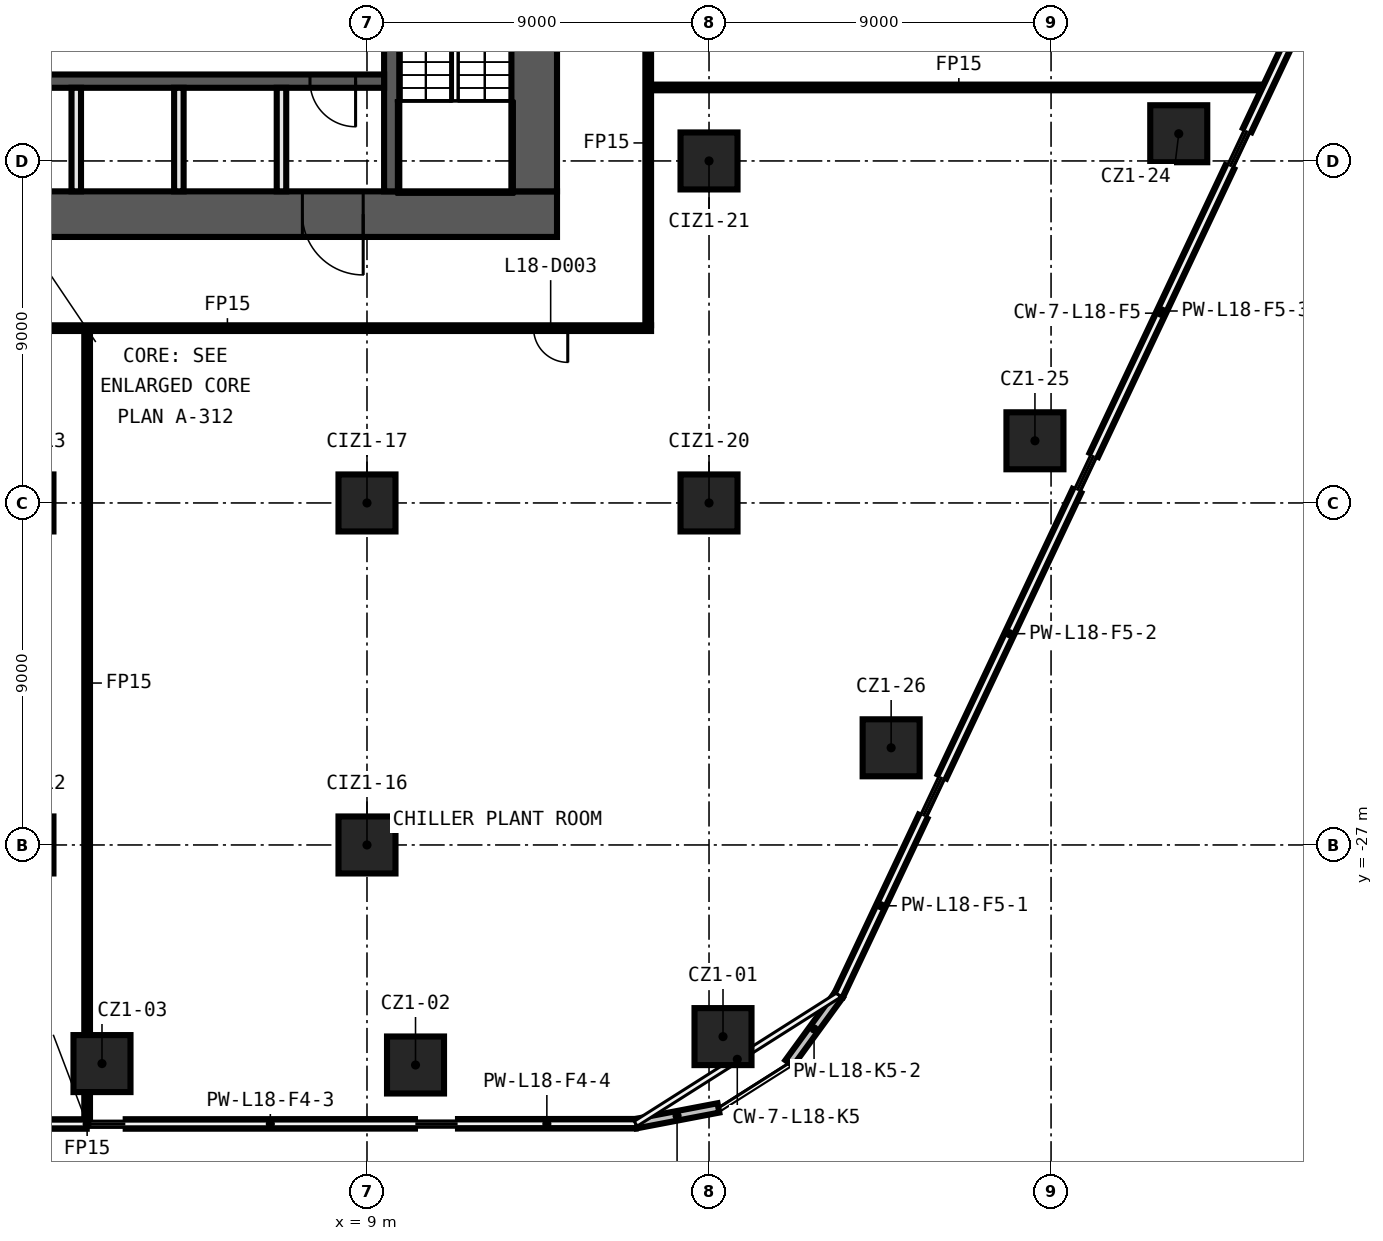
"""IFC4 building model, lengths in metres.
Left out: names, types, materials, properties, quantities, classifications, styles, units other than length and angle.
Written with IfcOpenShell. Run it as: python <this file> out.ifc"""

import sys

from ifc_helpers import new_model, si_unit, direction, frame, frame_2d, origin, origin_2d, place, context, subcontext, project, spatial, rectangle, extrude, element, fill, save


model = new_model("IFC4")
c1 = context("Model", 3, precision=1e-05, world=origin(), true_north=direction((0.0, 1.0)))
c2 = subcontext(c1, "Body", "Model", "MODEL_VIEW")
j1 = project(units=[si_unit("LENGTHUNIT", "METRE"), si_unit("PLANEANGLEUNIT", "RADIAN")], contexts=[c1])
p1 = place(None, origin())
s1 = spatial("IfcSite", under=j1, at=p1, CompositionType="ELEMENT")
p2 = place(p1, origin())
s2 = spatial("IfcBuilding", under=s1, at=p2, CompositionType="ELEMENT")
p3 = place(p2, frame((0.0, 0.0, 89.2)))
s3 = spatial("IfcBuildingStorey", under=s2, at=p3, CompositionType="ELEMENT", Elevation=89.2)
for number, where, z_axis, x_axis in (
    (1, (18.368, -32.043, 0.0), (0.0, 0.0, 1.0), (1.0, 0.0, 0.0)),
    (2, (10.277, -32.79, 0.0), (0.0, 0.0, 1.0), (1.0, 0.0, 0.0)),
    (3, (2.027, -32.753, 0.0), (0.0, 0.0, 1.0), (1.0, 0.0, 0.0)),
    (4, (30.36, -8.284, 0.0), (0.0, 0.0, 1.0), (1.0, 0.0, 0.0)),
    (5, (26.576, -16.364, 0.0), (0.0, 0.0, 1.0), (1.0, 0.0, 0.0)),
    (6, (22.792, -24.443, 0.0), (0.0, 0.0, 1.0), (1.0, 0.0, 0.0)),
    (7, (0.0, -27.0, 0.0), (0.0, 0.0, 1.0), (1.0, 0.0, 0.0)),
    (8, (0.0, -18.0, 0.0), (0.0, 0.0, 1.0), (1.0, 0.0, 0.0)),
    (9, (9.0, -27.0, 0.0), (0.0, 0.0, 1.0), (1.0, 0.0, 0.0)),
    (10, (9.0, -18.0, 0.0), (0.0, 0.0, 1.0), (1.0, 0.0, 0.0)),
    (11, (18.0, -18.0, 0.0), (0.0, 0.0, 1.0), (1.0, 0.0, 0.0)),
    (12, (18.0, -9.0, 0.0), (0.0, 0.0, 1.0), (1.0, 0.0, 0.0)),
):
    element("IfcColumn", number, at=place(p3, frame(where, z_axis=z_axis, x_axis=x_axis)), inside=s3, PredefinedType="COLUMN", context=c2, shape_type="SweptSolid", body=[
        extrude(rectangle(XDim=1.5, YDim=1.5, at=origin_2d()), origin(), (0.0, 0.0, 1.0), 5.55),
    ])
p4 = place(p3, frame((16.475, -13.4, 0.0), z_axis=(0.0, 0.0, 1.0), x_axis=(-1.0, 0.0, 0.0)))
e13 = element("IfcWall", 13, at=p4, inside=s3, PredefinedType="PARTITIONING", context=c2, shape_type="SweptSolid", body=[
    extrude(rectangle(XDim=32.95, YDim=0.15, at=frame_2d((16.475, 0.0))), origin(), (0.0, 0.0, 1.0), 5.55),
])
p5 = place(p4, frame((19.203, 0.0, 0.0)))
e14 = element("IfcOpeningElement", 14, at=p5, cuts=e13, PredefinedType="OPENING", context=c2, shape_type="SweptSolid", body=[
    extrude(rectangle(XDim=0.9, YDim=2.1, at=frame_2d((0.45, 1.05))), frame((0.0, 0.085, 0.0), z_axis=(0.0, -1.0, 0.0), x_axis=(1.0, 0.0, 0.0)), (0.0, 0.0, 1.0), 0.17),
])
p6 = place(p4, frame((2.192, 0.0, 0.0)))
e15 = element("IfcOpeningElement", 15, at=p6, cuts=e13, PredefinedType="OPENING", context=c2, shape_type="SweptSolid", body=[
    extrude(rectangle(XDim=0.9, YDim=2.1, at=frame_2d((0.45, 1.05))), frame((0.0, 0.085, 0.0), z_axis=(0.0, -1.0, 0.0), x_axis=(1.0, 0.0, 0.0)), (0.0, 0.0, 1.0), 0.17),
])
p7 = place(p3, frame((16.475, -7.066, 0.0), z_axis=(0.0, 0.0, 1.0), x_axis=(1.0, 0.0, 0.0)))
e16 = element("IfcWall", 16, at=p7, inside=s3, PredefinedType="PARTITIONING", context=c2, shape_type="SweptSolid", body=[
    extrude(rectangle(XDim=16.197, YDim=0.15, at=frame_2d((8.099, 0.0))), origin(), (0.0, 0.0, 1.0), 5.55),
])
p8 = place(p3, frame((16.4, 13.325, 0.0), z_axis=(0.0, 0.0, 1.0), x_axis=(0.0, -1.0, 0.0)))
e17 = element("IfcWall", 17, at=p8, inside=s3, PredefinedType="PARTITIONING", context=c2, shape_type="SweptSolid", body=[
    extrude(rectangle(XDim=26.65, YDim=0.15, at=frame_2d((13.325, 0.0))), origin(), (0.0, 0.0, 1.0), 5.55),
])
p9 = place(p8, frame((15.952, 0.0, 0.0)))
e18 = element("IfcOpeningElement", 18, at=p9, cuts=e17, PredefinedType="OPENING", context=c2, shape_type="SweptSolid", body=[
    extrude(rectangle(XDim=0.9, YDim=2.1, at=frame_2d((0.45, 1.05))), frame((0.0, 0.085, 0.0), z_axis=(0.0, -1.0, 0.0), x_axis=(1.0, 0.0, 0.0)), (0.0, 0.0, 1.0), 0.17),
])
p10 = place(p8, frame((9.969, 0.0, 0.0)))
e19 = element("IfcOpeningElement", 19, at=p10, cuts=e17, PredefinedType="OPENING", context=c2, shape_type="SweptSolid", body=[
    extrude(rectangle(XDim=0.9, YDim=2.1, at=frame_2d((0.45, 1.05))), frame((0.0, 0.085, 0.0), z_axis=(0.0, -1.0, 0.0), x_axis=(1.0, 0.0, 0.0)), (0.0, 0.0, 1.0), 0.17),
])
p11 = place(p8, frame((1.621, 0.0, 0.0)))
e20 = element("IfcOpeningElement", 20, at=p11, cuts=e17, PredefinedType="OPENING", context=c2, shape_type="SweptSolid", body=[
    extrude(rectangle(XDim=0.9, YDim=2.1, at=frame_2d((0.45, 1.05))), frame((0.0, 0.085, 0.0), z_axis=(0.0, -1.0, 0.0), x_axis=(1.0, 0.0, 0.0)), (0.0, 0.0, 1.0), 0.17),
])
p12 = place(p3, frame((1.636, -34.323, 0.0), z_axis=(0.0, 0.0, 1.0), x_axis=(0.0, 1.0, 0.0)))
e21 = element("IfcWall", 21, at=p12, inside=s3, PredefinedType="PARTITIONING", context=c2, shape_type="SweptSolid", body=[
    extrude(rectangle(XDim=0.82, YDim=0.15, at=frame_2d((0.41, 0.0))), origin(), (0.0, 0.0, 1.0), 5.55),
])
p13 = place(p3, frame((1.636, -32.003, 0.0), z_axis=(0.0, 0.0, 1.0), x_axis=(0.0, 1.0, 0.0)))
e22 = element("IfcWall", 22, at=p13, inside=s3, PredefinedType="PARTITIONING", context=c2, shape_type="SweptSolid", body=[
    extrude(rectangle(XDim=18.528, YDim=0.15, at=frame_2d((9.264, 0.0))), origin(), (0.0, 0.0, 1.0), 5.55),
])
p14 = place(p3, frame((-6.032, -34.347, 0.0), z_axis=(0.0, 0.0, 1.0), x_axis=(0.999999869879, 0.000510138947, 0.0)))
e23 = element("IfcWall", 23, at=p14, inside=s3, PredefinedType="SOLIDWALL", context=c2, shape_type="SweptSolid", body=[
    extrude(rectangle(XDim=7.657, YDim=0.25, at=frame_2d((3.829, 0.0))), origin(), (0.0, 0.0, 1.0), 5.55),
])
p15 = place(p3, frame((2.651, -34.342, 0.0), z_axis=(0.0, 0.0, 1.0), x_axis=(0.99999985131, 0.000545326152, 0.0)))
e24 = element("IfcWall", 24, at=p15, inside=s3, PredefinedType="SOLIDWALL", context=c2, shape_type="SweptSolid", body=[
    extrude(rectangle(XDim=7.611, YDim=0.25, at=frame_2d((3.805, 0.0))), origin(), (0.0, 0.0, 1.0), 5.55),
])
p16 = place(p3, frame((11.395, -34.338, 0.0), z_axis=(0.0, 0.0, 1.0), x_axis=(0.999999863686, 0.000522138609, 0.0)))
e25 = element("IfcWall", 25, at=p16, inside=s3, PredefinedType="SOLIDWALL", context=c2, shape_type="SweptSolid", body=[
    extrude(rectangle(XDim=4.676, YDim=0.25, at=frame_2d((2.338, 0.0))), origin(), (0.0, 0.0, 1.0), 5.55),
])
p17 = place(p3, frame((16.071, -34.335, 0.0), z_axis=(0.0, 0.0, 1.0), x_axis=(0.982246854251, 0.187592956464, 0.0)))
e26 = element("IfcWall", 26, at=p17, inside=s3, PredefinedType="SOLIDWALL", context=c2, shape_type="SweptSolid", body=[
    extrude(rectangle(XDim=2.216, YDim=0.25, at=frame_2d((1.108, 0.0))), origin(), (0.0, 0.0, 1.0), 5.55),
])
p18 = place(p3, frame((20.112, -32.738, 0.0), z_axis=(0.0, 0.0, 1.0), x_axis=(0.58864316002, 0.8083929924, 0.0)))
e27 = element("IfcWall", 27, at=p18, inside=s3, PredefinedType="SOLIDWALL", context=c2, shape_type="SweptSolid", body=[
    extrude(rectangle(XDim=2.217, YDim=0.25, at=frame_2d((1.108, 0.0))), origin(), (0.0, 0.0, 1.0), 5.55),
])
p19 = place(p3, frame((21.416, -30.946, 0.0), z_axis=(0.0, 0.0, 1.0), x_axis=(0.427034096602, 0.904235522604, 0.0)))
e28 = element("IfcWall", 28, at=p19, inside=s3, PredefinedType="SOLIDWALL", context=c2, shape_type="SweptSolid", body=[
    extrude(rectangle(XDim=5.188, YDim=0.25, at=frame_2d((2.594, 0.0))), origin(), (0.0, 0.0, 1.0), 5.55),
])
p20 = place(p3, frame((24.131, -25.198, 0.0), z_axis=(0.0, 0.0, 1.0), x_axis=(0.42704433416, 0.904230687746, 0.0)))
e29 = element("IfcWall", 29, at=p20, inside=s3, PredefinedType="SOLIDWALL", context=c2, shape_type="SweptSolid", body=[
    extrude(rectangle(XDim=8.311, YDim=0.25, at=frame_2d((4.156, 0.0))), origin(), (0.0, 0.0, 1.0), 5.55),
])
p21 = place(p3, frame((28.127, -16.736, 0.0), z_axis=(0.0, 0.0, 1.0), x_axis=(0.427037418028, 0.904233954021, 0.0)))
e30 = element("IfcWall", 30, at=p21, inside=s3, PredefinedType="SOLIDWALL", context=c2, shape_type="SweptSolid", body=[
    extrude(rectangle(XDim=8.377, YDim=0.25, at=frame_2d((4.188, 0.0))), origin(), (0.0, 0.0, 1.0), 5.55),
])
p22 = place(p3, frame((32.164, -8.189, 0.0), z_axis=(0.0, 0.0, 1.0), x_axis=(0.427023639186, 0.904240461147, 0.0)))
e31 = element("IfcWall", 31, at=p22, inside=s3, PredefinedType="SOLIDWALL", context=c2, shape_type="SweptSolid", body=[
    extrude(rectangle(XDim=8.317, YDim=0.25, at=frame_2d((4.159, 0.0))), origin(), (0.0, 0.0, 1.0), 5.55),
])
p23 = place(p3, frame((14.0, -10.4, 0.0), z_axis=(0.0, 0.0, 1.0), x_axis=(-1.0, 0.0, 0.0)))
e32 = element("IfcWall", 32, at=p23, inside=s3, PredefinedType="SHEAR", context=c2, shape_type="SweptSolid", body=[
    extrude(rectangle(XDim=28.0, YDim=1.2, at=frame_2d((14.0, 0.0))), origin(), (0.0, 0.0, 1.0), 5.55),
])
p24 = place(p23, frame((5.1, 0.0, 0.0)))
e33 = element("IfcOpeningElement", 33, at=p24, cuts=e32, PredefinedType="OPENING", context=c2, shape_type="SweptSolid", body=[
    extrude(rectangle(XDim=1.6, YDim=2.1, at=frame_2d((0.8, 1.05))), frame((0.0, 0.61, 0.0), z_axis=(0.0, -1.0, 0.0), x_axis=(1.0, 0.0, 0.0)), (0.0, 0.0, 1.0), 1.22),
])
p25 = place(p3, frame((13.4, 9.8, 0.0), z_axis=(0.0, 0.0, 1.0), x_axis=(0.0, -1.0, 0.0)))
e34 = element("IfcWall", 34, at=p25, inside=s3, PredefinedType="SHEAR", context=c2, shape_type="SweptSolid", body=[
    extrude(rectangle(XDim=19.6, YDim=1.2, at=frame_2d((9.8, 0.0))), origin(), (0.0, 0.0, 1.0), 5.55),
])
p26 = place(p3, frame((9.65, -2.3, 0.0), z_axis=(0.0, 0.0, 1.0), x_axis=(0.0, -1.0, 0.0)))
e35 = element("IfcWall", 35, at=p26, inside=s3, PredefinedType="SHEAR", context=c2, shape_type="SweptSolid", body=[
    extrude(rectangle(XDim=7.5, YDim=0.4, at=frame_2d((3.75, 0.0))), origin(), (0.0, 0.0, 1.0), 5.55),
])
p27 = place(p26, frame((1.2, 0.0, 0.0)))
e36 = element("IfcOpeningElement", 36, at=p27, cuts=e35, PredefinedType="OPENING", context=c2, shape_type="SweptSolid", body=[
    extrude(rectangle(XDim=1.2, YDim=2.1, at=frame_2d((0.6, 1.05))), frame((0.0, 0.21, 0.0), z_axis=(0.0, -1.0, 0.0), x_axis=(1.0, 0.0, 0.0)), (0.0, 0.0, 1.0), 0.42),
])
p28 = place(p3, frame((9.45, -6.9, 0.0), z_axis=(0.0, 0.0, 1.0), x_axis=(-1.0, 0.0, 0.0)))
e37 = element("IfcWall", 37, at=p28, inside=s3, PredefinedType="SHEAR", context=c2, shape_type="SweptSolid", body=[
    extrude(rectangle(XDim=18.9, YDim=0.35, at=frame_2d((9.45, 0.0))), origin(), (0.0, 0.0, 1.0), 5.55),
])
p29 = place(p28, frame((0.75, 0.0, 0.0)))
e38 = element("IfcOpeningElement", 38, at=p29, cuts=e37, PredefinedType="OPENING", context=c2, shape_type="SweptSolid", body=[
    extrude(rectangle(XDim=1.2, YDim=2.1, at=frame_2d((0.6, 1.05))), frame((0.0, 0.185, 0.0), z_axis=(0.0, -1.0, 0.0), x_axis=(1.0, 0.0, 0.0)), (0.0, 0.0, 1.0), 0.37),
])
p30 = place(p28, frame((17.1, 0.0, 0.0)))
e39 = element("IfcOpeningElement", 39, at=p30, cuts=e37, PredefinedType="OPENING", context=c2, shape_type="SweptSolid", body=[
    extrude(rectangle(XDim=0.9, YDim=2.1, at=frame_2d((0.45, 1.05))), frame((0.0, 0.185, 0.0), z_axis=(0.0, -1.0, 0.0), x_axis=(1.0, 0.0, 0.0)), (0.0, 0.0, 1.0), 0.37),
])
p31 = place(p28, frame((13.05, 0.0, 0.0)))
e40 = element("IfcOpeningElement", 40, at=p31, cuts=e37, PredefinedType="OPENING", context=c2, shape_type="SweptSolid", body=[
    extrude(rectangle(XDim=0.9, YDim=2.1, at=frame_2d((0.45, 1.05))), frame((0.0, 0.185, 0.0), z_axis=(0.0, -1.0, 0.0), x_axis=(1.0, 0.0, 0.0)), (0.0, 0.0, 1.0), 0.37),
])
p32 = place(p28, frame((9.0, 0.0, 0.0)))
e41 = element("IfcOpeningElement", 41, at=p32, cuts=e37, PredefinedType="OPENING", context=c2, shape_type="SweptSolid", body=[
    extrude(rectangle(XDim=0.9, YDim=2.1, at=frame_2d((0.45, 1.05))), frame((0.0, 0.185, 0.0), z_axis=(0.0, -1.0, 0.0), x_axis=(1.0, 0.0, 0.0)), (0.0, 0.0, 1.0), 0.37),
])
for number, where, z_axis, x_axis in (
    (42, (6.75, -9.8, 0.0), (0.0, 0.0, 1.0), (0.0, 1.0, 0.0)),
    (43, (4.05, -9.8, 0.0), (0.0, 0.0, 1.0), (0.0, 1.0, 0.0)),
    (44, (1.35, -9.8, 0.0), (0.0, 0.0, 1.0), (0.0, 1.0, 0.0)),
):
    element("IfcWall", number, at=place(p3, frame(where, z_axis=z_axis, x_axis=x_axis)), inside=s3, PredefinedType="SOLIDWALL", context=c2, shape_type="SweptSolid", body=[
        extrude(rectangle(XDim=2.725, YDim=0.25, at=frame_2d((1.363, 0.0))), origin(), (0.0, 0.0, 1.0), 5.55),
    ])
p33 = place(p6, origin())
e45 = element("IfcDoor", 45, at=p33, inside=s3, OperationType="SINGLE_SWING_RIGHT", PredefinedType="DOOR", context=c2, shape_type="SweptSolid", body=[
    extrude(rectangle(XDim=0.9, YDim=2.1, at=frame_2d((0.45, 1.05))), frame((0.0, 0.025, 0.0), z_axis=(0.0, -1.0, 0.0), x_axis=(1.0, 0.0, 0.0)), (0.0, 0.0, 1.0), 0.05),
])
fill(e15, e45)
p34 = place(p24, origin())
e46 = element("IfcDoor", 46, at=p34, inside=s3, OperationType="DOUBLE_DOOR_SINGLE_SWING", PredefinedType="DOOR", context=c2, shape_type="SweptSolid", body=[
    extrude(rectangle(XDim=1.6, YDim=2.1, at=frame_2d((0.8, 1.05))), frame((0.0, 0.025, 0.0), z_axis=(0.0, -1.0, 0.0), x_axis=(1.0, 0.0, 0.0)), (0.0, 0.0, 1.0), 0.05),
])
fill(e33, e46)
p35 = place(p29, origin())
e47 = element("IfcDoor", 47, at=p35, inside=s3, OperationType="SINGLE_SWING_LEFT", PredefinedType="DOOR", context=c2, shape_type="SweptSolid", body=[
    extrude(rectangle(XDim=1.2, YDim=2.1, at=frame_2d((0.6, 1.05))), frame((0.0, 0.025, 0.0), z_axis=(0.0, -1.0, 0.0), x_axis=(1.0, 0.0, 0.0)), (0.0, 0.0, 1.0), 0.05),
])
fill(e38, e47)
save(model, sys.argv[1])
